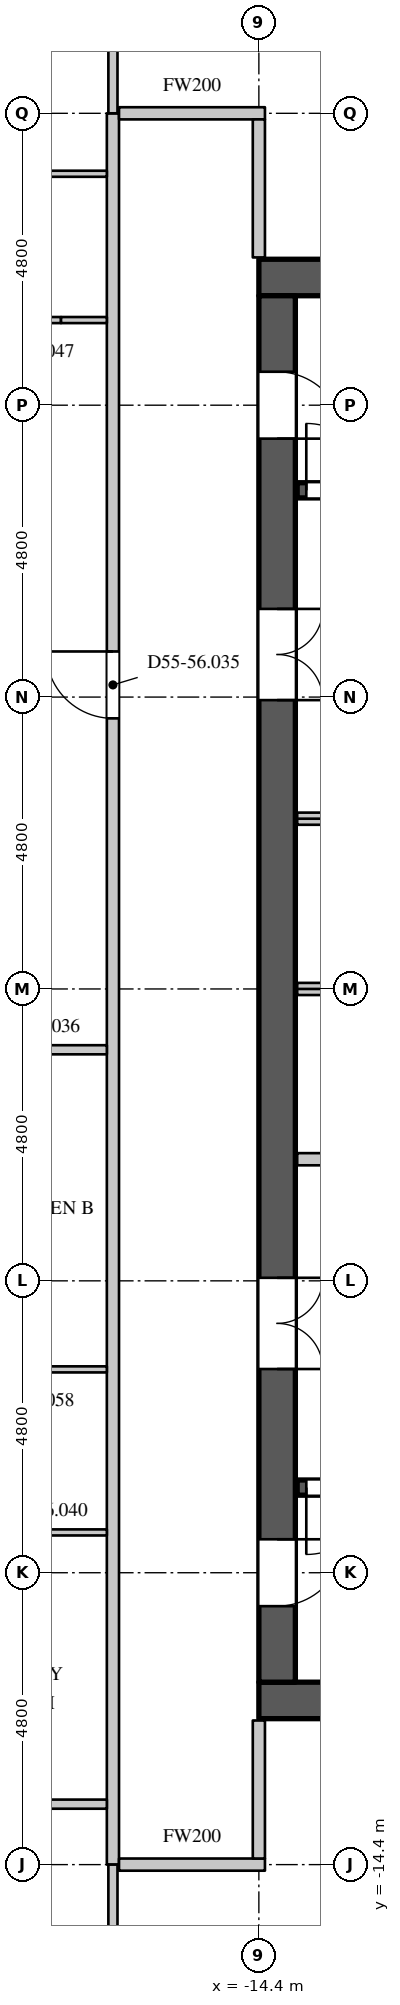
"""IFC4 building model, lengths in metres.
Left out: names, types, materials, properties, quantities, classifications, styles, units other than length and angle.
Written with IfcOpenShell. Run it as: python <this file> out.ifc"""

import sys

from ifc_helpers import new_model, si_unit, direction, frame, frame_2d, origin, place, context, subcontext, project, spatial, rectangle, extrude, element, fill, save


model = new_model("IFC4")
c1 = context("Model", 3, precision=1e-05, world=origin(), true_north=direction((0.0, 1.0)))
c2 = subcontext(c1, "Body", "Model", "MODEL_VIEW")
j1 = project(units=[si_unit("LENGTHUNIT", "METRE"), si_unit("PLANEANGLEUNIT", "RADIAN")], contexts=[c1])
p1 = place(None, origin())
s1 = spatial("IfcSite", under=j1, at=p1, CompositionType="ELEMENT")
p2 = place(p1, origin())
s2 = spatial("IfcBuilding", under=s1, at=p2, CompositionType="ELEMENT")
p3 = place(p2, frame((0.0, 0.0, 239.1)))
s3 = spatial("IfcBuildingStorey", under=s2, at=p3, CompositionType="ELEMENT", Elevation=239.1)
for number, where, z_axis, x_axis in (
    (1, (-14.4, 11.7, 0.0), (0.0, 0.0, 1.0), (1.0, 0.0, 0.0)),
    (2, (-14.4, -11.7, 0.0), (0.0, 0.0, 1.0), (1.0, 0.0, 0.0)),
):
    element("IfcWall", number, at=place(p3, frame(where, z_axis=z_axis, x_axis=x_axis)), inside=s3, PredefinedType="SHEAR", context=c2, shape_type="SweptSolid", body=[
        extrude(rectangle(XDim=28.8, YDim=0.6, at=frame_2d((14.4, 0.0))), origin(), (0.0, 0.0, 1.0), 4.2),
    ])
p4 = place(p3, frame((-14.1, -11.4, 0.0), z_axis=(0.0, 0.0, 1.0), x_axis=(0.0, 1.0, 0.0)))
e3 = element("IfcWall", 3, at=p4, inside=s3, PredefinedType="SHEAR", context=c2, shape_type="SweptSolid", body=[
    extrude(rectangle(XDim=22.8, YDim=0.6, at=frame_2d((11.4, 0.0))), origin(), (0.0, 0.0, 1.0), 4.2),
])
p5 = place(p4, frame((20.45, 0.0, 0.0)))
e4 = element("IfcOpeningElement", 4, at=p5, cuts=e3, PredefinedType="OPENING", context=c2, shape_type="SweptSolid", body=[
    extrude(rectangle(XDim=1.1, YDim=2.2, at=frame_2d((0.55, 1.1))), frame((0.0, 0.31, 0.0), z_axis=(0.0, -1.0, 0.0), x_axis=(1.0, 0.0, 0.0)), (0.0, 0.0, 1.0), 0.62),
])
p6 = place(p4, frame((1.25, 0.0, 0.0)))
e5 = element("IfcOpeningElement", 5, at=p6, cuts=e3, PredefinedType="OPENING", context=c2, shape_type="SweptSolid", body=[
    extrude(rectangle(XDim=1.1, YDim=2.2, at=frame_2d((0.55, 1.1))), frame((0.0, 0.31, 0.0), z_axis=(0.0, -1.0, 0.0), x_axis=(1.0, 0.0, 0.0)), (0.0, 0.0, 1.0), 0.62),
])
p7 = place(p4, frame((16.15, 0.0, 0.0)))
e6 = element("IfcOpeningElement", 6, at=p7, cuts=e3, PredefinedType="OPENING", context=c2, shape_type="SweptSolid", body=[
    extrude(rectangle(XDim=1.5, YDim=2.4, at=frame_2d((0.75, 1.2))), frame((0.0, 0.31, 0.0), z_axis=(0.0, -1.0, 0.0), x_axis=(1.0, 0.0, 0.0)), (0.0, 0.0, 1.0), 0.62),
])
p8 = place(p4, frame((5.15, 0.0, 0.0)))
e7 = element("IfcOpeningElement", 7, at=p8, cuts=e3, PredefinedType="OPENING", context=c2, shape_type="SweptSolid", body=[
    extrude(rectangle(XDim=1.5, YDim=2.4, at=frame_2d((0.75, 1.2))), frame((0.0, 0.31, 0.0), z_axis=(0.0, -1.0, 0.0), x_axis=(1.0, 0.0, 0.0)), (0.0, 0.0, 1.0), 0.62),
])
p9 = place(p3, frame((-16.8, -14.4, 0.0), z_axis=(0.0, 0.0, 1.0), x_axis=(0.0, 1.0, 0.0)))
e8 = element("IfcWall", 8, at=p9, inside=s3, PredefinedType="PARTITIONING", context=c2, shape_type="SweptSolid", body=[
    extrude(rectangle(XDim=28.8, YDim=0.2, at=frame_2d((14.4, 0.0))), origin(), (0.0, 0.0, 1.0), 3.95),
])
p10 = place(p9, frame((18.85, 0.0, 0.0)))
e9 = element("IfcOpeningElement", 9, at=p10, cuts=e8, PredefinedType="OPENING", context=c2, shape_type="SweptSolid", body=[
    extrude(rectangle(XDim=1.1, YDim=2.4, at=frame_2d((0.55, 1.2))), frame((0.0, 0.11, 0.0), z_axis=(0.0, -1.0, 0.0), x_axis=(1.0, 0.0, 0.0)), (0.0, 0.0, 1.0), 0.22),
])
for number, where, z_axis, x_axis in (
    (10, (-16.7, -14.4, 0.0), (0.0, 0.0, 1.0), (1.0, 0.0, 0.0)),
    (11, (-16.7, 14.4, 0.0), (0.0, 0.0, 1.0), (1.0, 0.0, 0.0)),
):
    element("IfcWall", number, at=place(p3, frame(where, z_axis=z_axis, x_axis=x_axis)), inside=s3, PredefinedType="PARTITIONING", context=c2, shape_type="SweptSolid", body=[
        extrude(rectangle(XDim=2.4, YDim=0.2, at=frame_2d((1.2, 0.0))), origin(), (0.0, 0.0, 1.0), 3.95),
    ])
for number, where, z_axis, x_axis in (
    (12, (-14.4, -14.3, 0.0), (0.0, 0.0, 1.0), (0.0, 1.0, 0.0)),
    (13, (-14.4, 12.03, 0.0), (0.0, 0.0, 1.0), (0.0, 1.0, 0.0)),
):
    element("IfcWall", number, at=place(p3, frame(where, z_axis=z_axis, x_axis=x_axis)), inside=s3, PredefinedType="PARTITIONING", context=c2, shape_type="SweptSolid", body=[
        extrude(rectangle(XDim=2.27, YDim=0.2, at=frame_2d((1.135, 0.0))), origin(), (0.0, 0.0, 1.0), 3.95),
    ])
p11 = place(p3, frame((-25.224, -13.406, 0.0), z_axis=(0.0, 0.0, 1.0), x_axis=(1.0, 0.0, 0.0)))
e14 = element("IfcWall", 14, at=p11, inside=s3, PredefinedType="PARTITIONING", context=c2, shape_type="SweptSolid", body=[
    extrude(rectangle(XDim=8.324, YDim=0.15, at=frame_2d((4.162, 0.0))), origin(), (0.0, 0.0, 1.0), 3.95),
])
p12 = place(p11, frame((1.843, 0.0, 0.0)))
e15 = element("IfcOpeningElement", 15, at=p12, cuts=e14, PredefinedType="OPENING", context=c2, shape_type="SweptSolid", body=[
    extrude(rectangle(XDim=1.5, YDim=2.2, at=frame_2d((0.75, 1.1))), frame((0.0, 0.085, 0.0), z_axis=(0.0, -1.0, 0.0), x_axis=(1.0, 0.0, 0.0)), (0.0, 0.0, 1.0), 0.17),
])
p13 = place(p3, frame((-20.525, -1.0, 0.0), z_axis=(0.0, 0.0, 1.0), x_axis=(1.0, 0.0, 0.0)))
e16 = element("IfcWall", 16, at=p13, inside=s3, PredefinedType="PARTITIONING", context=c2, shape_type="SweptSolid", body=[
    extrude(rectangle(XDim=3.625, YDim=0.15, at=frame_2d((1.812, 0.0))), origin(), (0.0, 0.0, 1.0), 3.95),
])
p14 = place(p13, frame((1.3, 0.0, 0.0)))
e17 = element("IfcOpeningElement", 17, at=p14, cuts=e16, PredefinedType="OPENING", context=c2, shape_type="SweptSolid", body=[
    extrude(rectangle(XDim=0.95, YDim=2.2, at=frame_2d((0.475, 1.1))), frame((0.0, 0.085, 0.0), z_axis=(0.0, -1.0, 0.0), x_axis=(1.0, 0.0, 0.0)), (0.0, 0.0, 1.0), 0.17),
])
p15 = place(p3, frame((-16.8, -19.828, 0.0), z_axis=(0.0, 0.0, 1.0), x_axis=(0.0, 1.0, 0.0)))
e18 = element("IfcWall", 18, at=p15, inside=s3, PredefinedType="PARTITIONING", context=c2, shape_type="SweptSolid", body=[
    extrude(rectangle(XDim=5.428, YDim=0.15, at=frame_2d((2.714, 0.0))), origin(), (0.0, 0.0, 1.0), 3.95),
])
p16 = place(p15, frame((3.3, 0.0, 0.0)))
e19 = element("IfcOpeningElement", 19, at=p16, cuts=e18, PredefinedType="OPENING", context=c2, shape_type="SweptSolid", body=[
    extrude(rectangle(XDim=0.95, YDim=2.2, at=frame_2d((0.475, 1.1))), frame((0.0, 0.085, 0.0), z_axis=(0.0, -1.0, 0.0), x_axis=(1.0, 0.0, 0.0)), (0.0, 0.0, 1.0), 0.17),
])
p17 = place(p3, frame((-16.8, 14.4, 0.0), z_axis=(0.0, 0.0, 1.0), x_axis=(0.0, 1.0, 0.0)))
e20 = element("IfcWall", 20, at=p17, inside=s3, PredefinedType="PARTITIONING", context=c2, shape_type="SweptSolid", body=[
    extrude(rectangle(XDim=5.428, YDim=0.15, at=frame_2d((2.714, 0.0))), origin(), (0.0, 0.0, 1.0), 3.95),
])
p18 = place(p17, frame((1.2, 0.0, 0.0)))
e21 = element("IfcOpeningElement", 21, at=p18, cuts=e20, PredefinedType="OPENING", context=c2, shape_type="SweptSolid", body=[
    extrude(rectangle(XDim=0.95, YDim=2.2, at=frame_2d((0.475, 1.1))), frame((0.0, 0.085, 0.0), z_axis=(0.0, -1.0, 0.0), x_axis=(1.0, 0.0, 0.0)), (0.0, 0.0, 1.0), 0.17),
])
p19 = place(p3, frame((-13.77, -2.8, 0.0), z_axis=(0.0, 0.0, 1.0), x_axis=(1.0, 0.0, 0.0)))
e22 = element("IfcWall", 22, at=p19, inside=s3, PredefinedType="PARTITIONING", context=c2, shape_type="SweptSolid", body=[
    extrude(rectangle(XDim=3.37, YDim=0.2, at=frame_2d((1.685, 0.0))), origin(), (0.0, 0.0, 1.0), 3.95),
])
p20 = place(p19, frame((1.35, 0.0, 0.0)))
e23 = element("IfcOpeningElement", 23, at=p20, cuts=e22, PredefinedType="OPENING", context=c2, shape_type="SweptSolid", body=[
    extrude(rectangle(XDim=0.6, YDim=2.0, at=frame_2d((0.3, 1.0))), frame((0.0, 0.11, 0.0), z_axis=(0.0, -1.0, 0.0), x_axis=(1.0, 0.0, 0.0)), (0.0, 0.0, 1.0), 0.22),
])
p21 = place(p3, frame((-13.77, 0.0, 0.0), z_axis=(0.0, 0.0, 1.0), x_axis=(1.0, 0.0, 0.0)))
e24 = element("IfcWall", 24, at=p21, inside=s3, PredefinedType="PARTITIONING", context=c2, shape_type="SweptSolid", body=[
    extrude(rectangle(XDim=21.57, YDim=0.2, at=frame_2d((10.785, 0.0))), origin(), (0.0, 0.0, 1.0), 3.95),
])
p22 = place(p3, frame((-13.77, 2.8, 0.0), z_axis=(0.0, 0.0, 1.0), x_axis=(1.0, 0.0, 0.0)))
e25 = element("IfcWall", 25, at=p22, inside=s3, PredefinedType="PARTITIONING", context=c2, shape_type="SweptSolid", body=[
    extrude(rectangle(XDim=5.95, YDim=0.2, at=frame_2d((2.975, 0.0))), origin(), (0.0, 0.0, 1.0), 3.95),
])
p23 = place(p22, frame((1.1, 0.0, 0.0)))
e26 = element("IfcOpeningElement", 26, at=p23, cuts=e25, PredefinedType="OPENING", context=c2, shape_type="SweptSolid", body=[
    extrude(rectangle(XDim=1.1, YDim=2.2, at=frame_2d((0.55, 1.1))), frame((0.0, 0.11, 0.0), z_axis=(0.0, -1.0, 0.0), x_axis=(1.0, 0.0, 0.0)), (0.0, 0.0, 1.0), 0.22),
])
p24 = place(p22, frame((4.1, 0.0, 0.0)))
e27 = element("IfcOpeningElement", 27, at=p24, cuts=e25, PredefinedType="OPENING", context=c2, shape_type="SweptSolid", body=[
    extrude(rectangle(XDim=1.1, YDim=2.2, at=frame_2d((0.55, 1.1))), frame((0.0, 0.11, 0.0), z_axis=(0.0, -1.0, 0.0), x_axis=(1.0, 0.0, 0.0)), (0.0, 0.0, 1.0), 0.22),
])
p25 = place(p3, frame((-13.77, -8.2, 0.0), z_axis=(0.0, 0.0, 1.0), x_axis=(1.0, 0.0, 0.0)))
e28 = element("IfcWall", 28, at=p25, inside=s3, PredefinedType="SHEAR", context=c2, shape_type="SweptSolid", body=[
    extrude(rectangle(XDim=8.495, YDim=0.25, at=frame_2d((4.248, 0.0))), origin(), (0.0, 0.0, 1.0), 3.95),
])
p26 = place(p25, frame((0.15, 0.0, 0.0)))
e29 = element("IfcOpeningElement", 29, at=p26, cuts=e28, PredefinedType="OPENING", context=c2, shape_type="SweptSolid", body=[
    extrude(rectangle(XDim=1.1, YDim=2.2, at=frame_2d((0.55, 1.1))), frame((0.0, 0.135, 0.0), z_axis=(0.0, -1.0, 0.0), x_axis=(1.0, 0.0, 0.0)), (0.0, 0.0, 1.0), 0.27),
])
p27 = place(p3, frame((-13.77, 8.2, 0.0), z_axis=(0.0, 0.0, 1.0), x_axis=(1.0, 0.0, 0.0)))
e30 = element("IfcWall", 30, at=p27, inside=s3, PredefinedType="SHEAR", context=c2, shape_type="SweptSolid", body=[
    extrude(rectangle(XDim=8.495, YDim=0.25, at=frame_2d((4.248, 0.0))), origin(), (0.0, 0.0, 1.0), 3.95),
])
p28 = place(p27, frame((0.15, 0.0, 0.0)))
e31 = element("IfcOpeningElement", 31, at=p28, cuts=e30, PredefinedType="OPENING", context=c2, shape_type="SweptSolid", body=[
    extrude(rectangle(XDim=1.1, YDim=2.2, at=frame_2d((0.55, 1.1))), frame((0.0, 0.135, 0.0), z_axis=(0.0, -1.0, 0.0), x_axis=(1.0, 0.0, 0.0)), (0.0, 0.0, 1.0), 0.27),
])
p29 = place(p3, frame((-20.58, -8.937, 0.0), z_axis=(0.0, 0.0, 1.0), x_axis=(1.0, 0.0, 0.0)))
e32 = element("IfcWall", 32, at=p29, inside=s3, PredefinedType="PARTITIONING", context=c2, shape_type="SweptSolid", body=[
    extrude(rectangle(XDim=3.68, YDim=0.1, at=frame_2d((1.84, 0.0))), origin(), (0.0, 0.0, 1.0), 3.95),
])
p30 = place(p29, frame((1.8, 0.0, 0.0)))
e33 = element("IfcOpeningElement", 33, at=p30, cuts=e32, PredefinedType="OPENING", context=c2, shape_type="SweptSolid", body=[
    extrude(rectangle(XDim=0.9, YDim=2.2, at=frame_2d((0.45, 1.1))), frame((0.0, 0.06, 0.0), z_axis=(0.0, -1.0, 0.0), x_axis=(1.0, 0.0, 0.0)), (0.0, 0.0, 1.0), 0.12),
])
p31 = place(p3, frame((-20.525, -6.256, 0.0), z_axis=(0.0, 0.0, 1.0), x_axis=(1.0, 0.0, 0.0)))
e34 = element("IfcWall", 34, at=p31, inside=s3, PredefinedType="PARTITIONING", context=c2, shape_type="SweptSolid", body=[
    extrude(rectangle(XDim=3.625, YDim=0.1, at=frame_2d((1.812, 0.0))), origin(), (0.0, 0.0, 1.0), 3.95),
])
p32 = place(p31, frame((1.35, 0.0, 0.0)))
e35 = element("IfcOpeningElement", 35, at=p32, cuts=e34, PredefinedType="OPENING", context=c2, shape_type="SweptSolid", body=[
    extrude(rectangle(XDim=0.9, YDim=2.2, at=frame_2d((0.45, 1.1))), frame((0.0, 0.06, 0.0), z_axis=(0.0, -1.0, 0.0), x_axis=(1.0, 0.0, 0.0)), (0.0, 0.0, 1.0), 0.12),
])
p33 = place(p3, frame((-20.525, 11.0, 0.0), z_axis=(0.0, 0.0, 1.0), x_axis=(1.0, 0.0, 0.0)))
e36 = element("IfcWall", 36, at=p33, inside=s3, PredefinedType="PARTITIONING", context=c2, shape_type="SweptSolid", body=[
    extrude(rectangle(XDim=2.871, YDim=0.1, at=frame_2d((1.436, 0.0))), origin(), (0.0, 0.0, 1.0), 3.95),
])
p34 = place(p33, frame((1.35, 0.0, 0.0)))
e37 = element("IfcOpeningElement", 37, at=p34, cuts=e36, PredefinedType="OPENING", context=c2, shape_type="SweptSolid", body=[
    extrude(rectangle(XDim=0.9, YDim=2.2, at=frame_2d((0.45, 1.1))), frame((0.0, 0.06, 0.0), z_axis=(0.0, -1.0, 0.0), x_axis=(1.0, 0.0, 0.0)), (0.0, 0.0, 1.0), 0.12),
])
p35 = place(p3, frame((-17.654, 11.0, 0.0), z_axis=(0.0, 0.0, 1.0), x_axis=(1.0, 0.0, 0.0)))
e38 = element("IfcWall", 38, at=p35, inside=s3, PredefinedType="PARTITIONING", context=c2, shape_type="SweptSolid", body=[
    extrude(rectangle(XDim=0.754, YDim=0.1, at=frame_2d((0.377, 0.0))), origin(), (0.0, 0.0, 1.0), 3.35),
])
p36 = place(p3, frame((-20.6, 13.406, 0.0), z_axis=(0.0, 0.0, 1.0), x_axis=(1.0, 0.0, 0.0)))
e39 = element("IfcWall", 39, at=p36, inside=s3, PredefinedType="PARTITIONING", context=c2, shape_type="SweptSolid", body=[
    extrude(rectangle(XDim=3.7, YDim=0.1, at=frame_2d((1.85, 0.0))), origin(), (0.0, 0.0, 1.0), 3.95),
])
p37 = place(p28, origin())
e40 = element("IfcDoor", 40, at=p37, inside=s3, OperationType="SINGLE_SWING_LEFT", PredefinedType="DOOR", context=c2, shape_type="SweptSolid", body=[
    extrude(rectangle(XDim=1.1, YDim=2.2, at=frame_2d((0.55, 1.1))), frame((0.0, 0.025, 0.0), z_axis=(0.0, -1.0, 0.0), x_axis=(1.0, 0.0, 0.0)), (0.0, 0.0, 1.0), 0.05),
])
fill(e31, e40)
p38 = place(p26, origin())
e41 = element("IfcDoor", 41, at=p38, inside=s3, OperationType="SINGLE_SWING_RIGHT", PredefinedType="DOOR", context=c2, shape_type="SweptSolid", body=[
    extrude(rectangle(XDim=1.1, YDim=2.2, at=frame_2d((0.55, 1.1))), frame((0.0, 0.025, 0.0), z_axis=(0.0, -1.0, 0.0), x_axis=(1.0, 0.0, 0.0)), (0.0, 0.0, 1.0), 0.05),
])
fill(e29, e41)
p39 = place(p5, origin())
e42 = element("IfcDoor", 42, at=p39, inside=s3, OperationType="SINGLE_SWING_RIGHT", PredefinedType="DOOR", context=c2, shape_type="SweptSolid", body=[
    extrude(rectangle(XDim=1.1, YDim=2.2, at=frame_2d((0.55, 1.1))), frame((0.0, -0.245, 0.0), z_axis=(0.0, -1.0, 0.0), x_axis=(1.0, 0.0, 0.0)), (0.0, 0.0, 1.0), 0.05),
])
fill(e4, e42)
p40 = place(p6, origin())
e43 = element("IfcDoor", 43, at=p40, inside=s3, OperationType="SINGLE_SWING_LEFT", PredefinedType="DOOR", context=c2, shape_type="SweptSolid", body=[
    extrude(rectangle(XDim=1.1, YDim=2.2, at=frame_2d((0.55, 1.1))), frame((0.0, -0.245, 0.0), z_axis=(0.0, -1.0, 0.0), x_axis=(1.0, 0.0, 0.0)), (0.0, 0.0, 1.0), 0.05),
])
fill(e5, e43)
p41 = place(p7, origin())
e44 = element("IfcDoor", 44, at=p41, inside=s3, OperationType="DOUBLE_DOOR_SINGLE_SWING", PredefinedType="DOOR", context=c2, shape_type="SweptSolid", body=[
    extrude(rectangle(XDim=1.5, YDim=2.4, at=frame_2d((0.75, 1.2))), frame((0.0, -0.245, 0.0), z_axis=(0.0, -1.0, 0.0), x_axis=(1.0, 0.0, 0.0)), (0.0, 0.0, 1.0), 0.05),
])
fill(e6, e44)
p42 = place(p8, origin())
e45 = element("IfcDoor", 45, at=p42, inside=s3, OperationType="DOUBLE_DOOR_SINGLE_SWING", PredefinedType="DOOR", context=c2, shape_type="SweptSolid", body=[
    extrude(rectangle(XDim=1.5, YDim=2.4, at=frame_2d((0.75, 1.2))), frame((0.0, -0.245, 0.0), z_axis=(0.0, -1.0, 0.0), x_axis=(1.0, 0.0, 0.0)), (0.0, 0.0, 1.0), 0.05),
])
fill(e7, e45)
p43 = place(p10, origin())
e46 = element("IfcDoor", 46, at=p43, inside=s3, OperationType="SINGLE_SWING_RIGHT", PredefinedType="DOOR", context=c2, shape_type="SweptSolid", body=[
    extrude(rectangle(XDim=1.1, YDim=2.4, at=frame_2d((0.55, 1.2))), frame((0.0, 0.025, 0.0), z_axis=(0.0, -1.0, 0.0), x_axis=(1.0, 0.0, 0.0)), (0.0, 0.0, 1.0), 0.05),
])
fill(e9, e46)
save(model, sys.argv[1])
